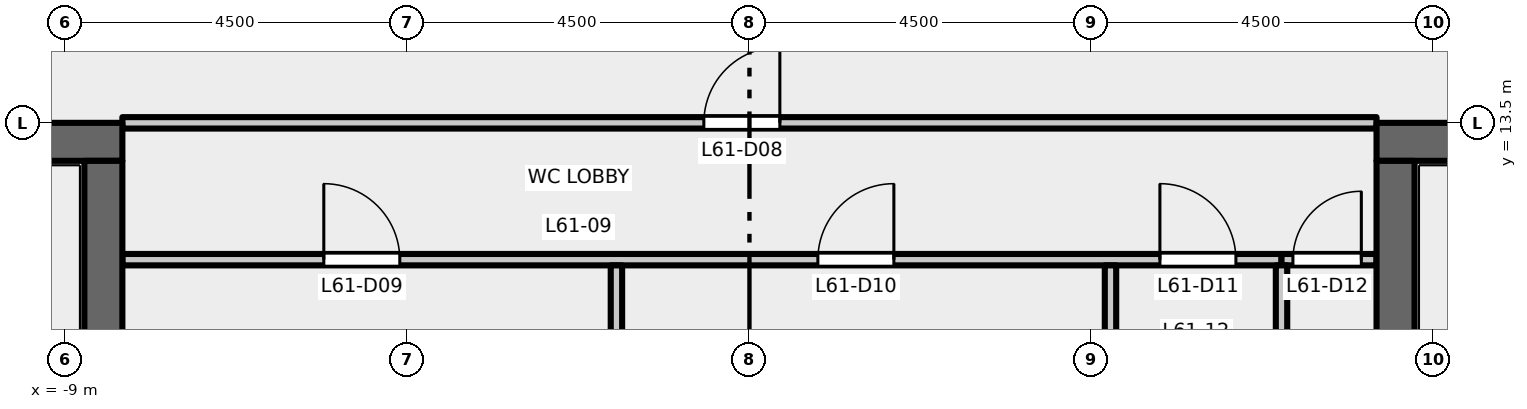
"""IFC4 building model, lengths in metres.
Left out: names, types, materials, properties, quantities, classifications, styles, units other than length and angle.
Written with IfcOpenShell. Run it as: python <this file> out.ifc"""

import sys

from ifc_helpers import new_model, si_unit, direction, frame, frame_2d, origin, place, context, subcontext, project, spatial, rectangle, extrude, element, fill, save


model = new_model("IFC4")
c1 = context("Model", 3, precision=1e-05, world=origin(), true_north=direction((0.0, 1.0)))
c2 = subcontext(c1, "Body", "Model", "MODEL_VIEW")
j1 = project(units=[si_unit("LENGTHUNIT", "METRE"), si_unit("PLANEANGLEUNIT", "RADIAN")], contexts=[c1])
p1 = place(None, origin())
s1 = spatial("IfcSite", under=j1, at=p1, CompositionType="ELEMENT")
p2 = place(p1, origin())
s2 = spatial("IfcBuilding", under=s1, at=p2, CompositionType="ELEMENT")
p3 = place(p2, frame((0.0, 0.0, 284.2)))
s3 = spatial("IfcBuildingStorey", under=s2, at=p3, CompositionType="ELEMENT", Elevation=284.2)
p4 = place(p3, frame((-8.25, 13.25, 0.0), z_axis=(0.0, 0.0, 1.0), x_axis=(-1.0, 0.0, 0.0)))
e1 = element("IfcWall", 1, at=p4, inside=s3, PredefinedType="SHEAR", context=c2, shape_type="SweptSolid", body=[
    extrude(rectangle(XDim=9.0, YDim=0.5, at=frame_2d((4.5, 0.0))), origin(), (0.0, 0.0, 1.0), 5.35),
])
p5 = place(p3, frame((-8.5, -13.0, 0.0), z_axis=(0.0, 0.0, 1.0), x_axis=(0.0, 1.0, 0.0)))
e2 = element("IfcWall", 2, at=p5, inside=s3, PredefinedType="SHEAR", context=c2, shape_type="SweptSolid", body=[
    extrude(rectangle(XDim=26.0, YDim=0.5, at=frame_2d((13.0, 0.0))), origin(), (0.0, 0.0, 1.0), 5.35),
])
p6 = place(p3, frame((8.25, 13.25, 0.0), z_axis=(0.0, 0.0, 1.0), x_axis=(1.0, 0.0, 0.0)))
e3 = element("IfcWall", 3, at=p6, inside=s3, PredefinedType="SHEAR", context=c2, shape_type="SweptSolid", body=[
    extrude(rectangle(XDim=9.0, YDim=0.5, at=frame_2d((4.5, 0.0))), origin(), (0.0, 0.0, 1.0), 5.35),
])
p7 = place(p3, frame((8.5, -13.0, 0.0), z_axis=(0.0, 0.0, 1.0), x_axis=(0.0, 1.0, 0.0)))
e4 = element("IfcWall", 4, at=p7, inside=s3, PredefinedType="SHEAR", context=c2, shape_type="SweptSolid", body=[
    extrude(rectangle(XDim=26.0, YDim=0.5, at=frame_2d((13.0, 0.0))), origin(), (0.0, 0.0, 1.0), 5.35),
])
p8 = place(p3, frame((-8.25, 11.7, 0.0), z_axis=(0.0, 0.0, 1.0), x_axis=(1.0, 0.0, 0.0)))
e5 = element("IfcWall", 5, at=p8, inside=s3, PredefinedType="PARTITIONING", context=c2, shape_type="SweptSolid", body=[
    extrude(rectangle(XDim=15.25, YDim=0.15, at=frame_2d((7.625, 0.0))), origin(), (0.0, 0.0, 1.0), 5.35),
])
p9 = place(p8, frame((2.65, 0.0, 0.0)))
e6 = element("IfcOpeningElement", 6, at=p9, cuts=e5, PredefinedType="OPENING", context=c2, shape_type="SweptSolid", body=[
    extrude(rectangle(XDim=1.0, YDim=2.1, at=frame_2d((0.5, 1.05))), frame((0.0, 0.085, 0.0), z_axis=(0.0, -1.0, 0.0), x_axis=(1.0, 0.0, 0.0)), (0.0, 0.0, 1.0), 0.17),
])
p10 = place(p8, frame((9.15, 0.0, 0.0)))
e7 = element("IfcOpeningElement", 7, at=p10, cuts=e5, PredefinedType="OPENING", context=c2, shape_type="SweptSolid", body=[
    extrude(rectangle(XDim=1.0, YDim=2.1, at=frame_2d((0.5, 1.05))), frame((0.0, 0.085, 0.0), z_axis=(0.0, -1.0, 0.0), x_axis=(1.0, 0.0, 0.0)), (0.0, 0.0, 1.0), 0.17),
])
p11 = place(p8, frame((13.65, 0.0, 0.0)))
e8 = element("IfcOpeningElement", 8, at=p11, cuts=e5, PredefinedType="OPENING", context=c2, shape_type="SweptSolid", body=[
    extrude(rectangle(XDim=1.0, YDim=2.1, at=frame_2d((0.5, 1.05))), frame((0.0, 0.085, 0.0), z_axis=(0.0, -1.0, 0.0), x_axis=(1.0, 0.0, 0.0)), (0.0, 0.0, 1.0), 0.17),
])
p12 = place(p3, frame((7.0, 11.7, 0.0), z_axis=(0.0, 0.0, 1.0), x_axis=(1.0, 0.0, 0.0)))
e9 = element("IfcWall", 9, at=p12, inside=s3, PredefinedType="PARTITIONING", context=c2, shape_type="SweptSolid", body=[
    extrude(rectangle(XDim=1.25, YDim=0.15, at=frame_2d((0.625, 0.0))), origin(), (0.0, 0.0, 1.0), 5.35),
])
p13 = place(p12, frame((0.15, 0.0, 0.0)))
e10 = element("IfcOpeningElement", 10, at=p13, cuts=e9, PredefinedType="OPENING", context=c2, shape_type="SweptSolid", body=[
    extrude(rectangle(XDim=0.9, YDim=2.1, at=frame_2d((0.45, 1.05))), frame((0.0, 0.085, 0.0), z_axis=(0.0, -1.0, 0.0), x_axis=(1.0, 0.0, 0.0)), (0.0, 0.0, 1.0), 0.17),
])
p14 = place(p3, frame((-8.25, 13.5, 0.0), z_axis=(0.0, 0.0, 1.0), x_axis=(1.0, 0.0, 0.0)))
e11 = element("IfcWall", 11, at=p14, inside=s3, PredefinedType="PARTITIONING", context=c2, shape_type="SweptSolid", body=[
    extrude(rectangle(XDim=16.5, YDim=0.15, at=frame_2d((8.25, 0.0))), origin(), (0.0, 0.0, 1.0), 5.35),
])
p15 = place(p14, frame((7.65, 0.0, 0.0)))
e12 = element("IfcOpeningElement", 12, at=p15, cuts=e11, PredefinedType="OPENING", context=c2, shape_type="SweptSolid", body=[
    extrude(rectangle(XDim=1.0, YDim=2.1, at=frame_2d((0.5, 1.05))), frame((0.0, 0.085, 0.0), z_axis=(0.0, -1.0, 0.0), x_axis=(1.0, 0.0, 0.0)), (0.0, 0.0, 1.0), 0.17),
])
for number, where, z_axis, x_axis in (
    (13, (-1.75, 8.37, 0.0), (0.0, 0.0, 1.0), (0.0, 1.0, 0.0)),
    (14, (4.75, 8.37, 0.0), (0.0, 0.0, 1.0), (0.0, 1.0, 0.0)),
):
    element("IfcWall", number, at=place(p3, frame(where, z_axis=z_axis, x_axis=x_axis)), inside=s3, PredefinedType="PARTITIONING", context=c2, shape_type="SweptSolid", body=[
        extrude(rectangle(XDim=3.255, YDim=0.15, at=frame_2d((1.627, 0.0))), origin(), (0.0, 0.0, 1.0), 5.35),
    ])
p16 = place(p3, frame((7.0, 8.07, 0.0), z_axis=(0.0, 0.0, 1.0), x_axis=(0.0, 1.0, 0.0)))
e15 = element("IfcWall", 15, at=p16, inside=s3, PredefinedType="PARTITIONING", context=c2, shape_type="SweptSolid", body=[
    extrude(rectangle(XDim=3.555, YDim=0.15, at=frame_2d((1.777, 0.0))), origin(), (0.0, 0.0, 1.0), 5.35),
])
p17 = place(p15, origin())
e16 = element("IfcDoor", 16, at=p17, inside=s3, OperationType="SINGLE_SWING_RIGHT", PredefinedType="DOOR", context=c2, shape_type="SweptSolid", body=[
    extrude(rectangle(XDim=1.0, YDim=2.1, at=frame_2d((0.5, 1.05))), frame((0.0, 0.025, 0.0), z_axis=(0.0, -1.0, 0.0), x_axis=(1.0, 0.0, 0.0)), (0.0, 0.0, 1.0), 0.05),
])
fill(e12, e16)
p18 = place(p9, origin())
e17 = element("IfcDoor", 17, at=p18, inside=s3, OperationType="SINGLE_SWING_LEFT", PredefinedType="DOOR", context=c2, shape_type="SweptSolid", body=[
    extrude(rectangle(XDim=1.0, YDim=2.1, at=frame_2d((0.5, 1.05))), frame((0.0, 0.025, 0.0), z_axis=(0.0, -1.0, 0.0), x_axis=(1.0, 0.0, 0.0)), (0.0, 0.0, 1.0), 0.05),
])
fill(e6, e17)
p19 = place(p10, origin())
e18 = element("IfcDoor", 18, at=p19, inside=s3, OperationType="SINGLE_SWING_RIGHT", PredefinedType="DOOR", context=c2, shape_type="SweptSolid", body=[
    extrude(rectangle(XDim=1.0, YDim=2.1, at=frame_2d((0.5, 1.05))), frame((0.0, 0.025, 0.0), z_axis=(0.0, -1.0, 0.0), x_axis=(1.0, 0.0, 0.0)), (0.0, 0.0, 1.0), 0.05),
])
fill(e7, e18)
p20 = place(p11, origin())
e19 = element("IfcDoor", 19, at=p20, inside=s3, OperationType="SINGLE_SWING_LEFT", PredefinedType="DOOR", context=c2, shape_type="SweptSolid", body=[
    extrude(rectangle(XDim=1.0, YDim=2.1, at=frame_2d((0.5, 1.05))), frame((0.0, 0.025, 0.0), z_axis=(0.0, -1.0, 0.0), x_axis=(1.0, 0.0, 0.0)), (0.0, 0.0, 1.0), 0.05),
])
fill(e8, e19)
p21 = place(p13, origin())
e20 = element("IfcDoor", 20, at=p21, inside=s3, OperationType="SINGLE_SWING_RIGHT", PredefinedType="DOOR", context=c2, shape_type="SweptSolid", body=[
    extrude(rectangle(XDim=0.9, YDim=2.1, at=frame_2d((0.45, 1.05))), frame((0.0, 0.025, 0.0), z_axis=(0.0, -1.0, 0.0), x_axis=(1.0, 0.0, 0.0)), (0.0, 0.0, 1.0), 0.05),
])
fill(e10, e20)
save(model, sys.argv[1])
